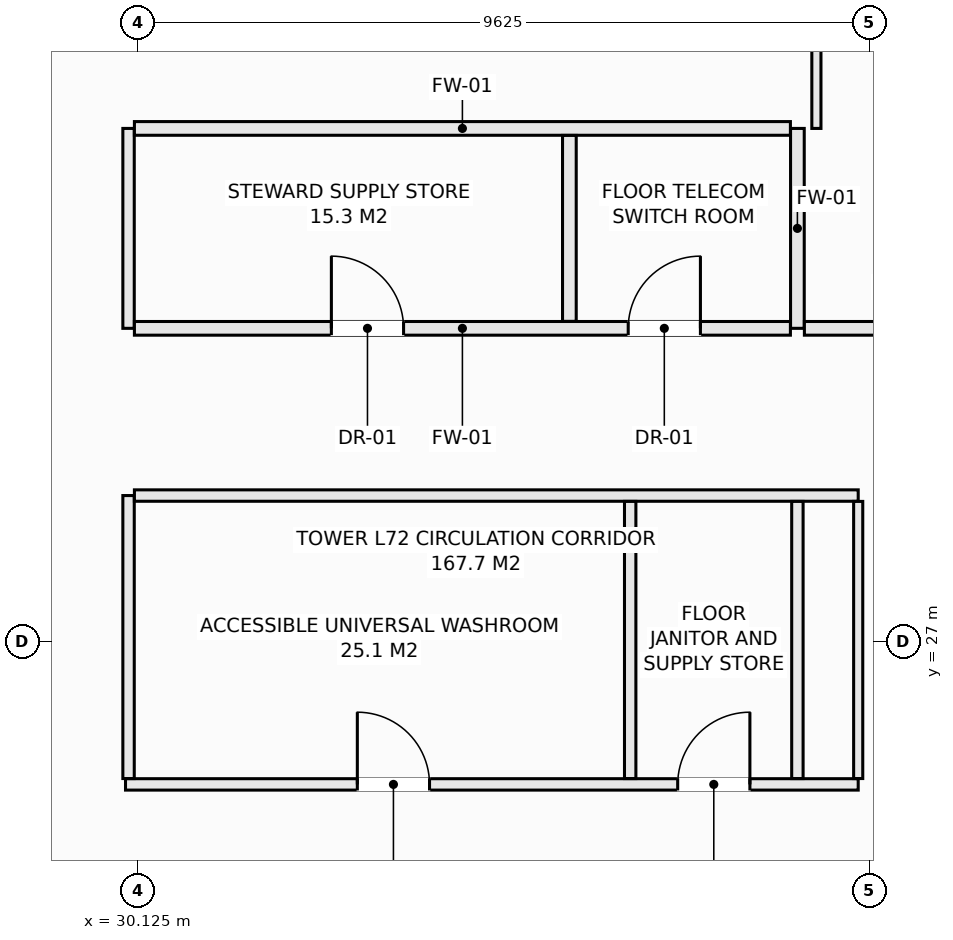
"""IFC4 building model, lengths in metres.
Left out: names, types, materials, properties, quantities, classifications, styles, units other than length and angle.
Written with IfcOpenShell. Run it as: python <this file> out.ifc"""

import sys

from ifc_helpers import new_model, si_unit, direction, frame, frame_2d, origin, place, context, subcontext, project, spatial, rectangle, extrude, element, fill, save


model = new_model("IFC4")
c1 = context("Model", 3, precision=1e-05, world=origin(), true_north=direction((0.0, 1.0)))
c2 = subcontext(c1, "Body", "Model", "MODEL_VIEW")
j1 = project(units=[si_unit("LENGTHUNIT", "METRE"), si_unit("PLANEANGLEUNIT", "RADIAN")], contexts=[c1])
p1 = place(None, origin())
s1 = spatial("IfcSite", under=j1, at=p1, CompositionType="ELEMENT")
p2 = place(p1, origin())
s2 = spatial("IfcBuilding", under=s1, at=p2, CompositionType="ELEMENT")
p3 = place(p2, frame((0.0, 0.0, 265.7)))
s3 = spatial("IfcBuildingStorey", under=s2, at=p3, CompositionType="ELEMENT", Elevation=265.7)
p4 = place(p3, frame((29.96, 25.12, 0.0), z_axis=(0.0, 0.0, 1.0), x_axis=(1.0, 0.0, 0.0)))
e1 = element("IfcWall", 1, at=p4, inside=s3, PredefinedType="PARTITIONING", context=c2, shape_type="SweptSolid", body=[
    extrude(rectangle(XDim=9.64, YDim=0.15, at=frame_2d((4.82, 0.0))), origin(), (0.0, 0.0, 1.0), 3.03),
])
p5 = place(p4, frame((3.05, 0.0, 0.0)))
e2 = element("IfcOpeningElement", 2, at=p5, cuts=e1, PredefinedType="OPENING", context=c2, shape_type="SweptSolid", body=[
    extrude(rectangle(XDim=0.95, YDim=2.1, at=frame_2d((0.475, 1.05))), frame((0.0, 0.085, 0.0), z_axis=(0.0, -1.0, 0.0), x_axis=(1.0, 0.0, 0.0)), (0.0, 0.0, 1.0), 0.17),
])
p6 = place(p4, frame((7.265, 0.0, 0.0)))
e3 = element("IfcOpeningElement", 3, at=p6, cuts=e1, PredefinedType="OPENING", context=c2, shape_type="SweptSolid", body=[
    extrude(rectangle(XDim=0.95, YDim=2.1, at=frame_2d((0.475, 1.05))), frame((0.0, 0.085, 0.0), z_axis=(0.0, -1.0, 0.0), x_axis=(1.0, 0.0, 0.0)), (0.0, 0.0, 1.0), 0.17),
])
p7 = place(p3, frame((30.0, 25.197, 0.0), z_axis=(0.0, 0.0, 1.0), x_axis=(0.0, 1.0, 0.0)))
e4 = element("IfcWall", 4, at=p7, inside=s3, PredefinedType="PARTITIONING", context=c2, shape_type="SweptSolid", body=[
    extrude(rectangle(XDim=3.723, YDim=0.15, at=frame_2d((1.861, 0.0))), origin(), (0.0, 0.0, 1.0), 3.03),
])
p8 = place(p3, frame((30.0, 31.12, 0.0), z_axis=(0.0, 0.0, 1.0), x_axis=(0.0, 1.0, 0.0)))
e5 = element("IfcWall", 5, at=p8, inside=s3, PredefinedType="PARTITIONING", context=c2, shape_type="SweptSolid", body=[
    extrude(rectangle(XDim=2.63, YDim=0.15, at=frame_2d((1.315, 0.0))), origin(), (0.0, 0.0, 1.0), 3.03),
])
p9 = place(p3, frame((30.077, 28.92, 0.0), z_axis=(0.0, 0.0, 1.0), x_axis=(1.0, 0.0, 0.0)))
e6 = element("IfcWall", 6, at=p9, inside=s3, PredefinedType="PARTITIONING", context=c2, shape_type="SweptSolid", body=[
    extrude(rectangle(XDim=9.523, YDim=0.15, at=frame_2d((4.762, 0.0))), origin(), (0.0, 0.0, 1.0), 3.03),
])
for number, where, z_axis, x_axis in (
    (7, (36.6, 25.197, 0.0), (0.0, 0.0, 1.0), (0.0, 1.0, 0.0)),
    (8, (38.8, 25.197, 0.0), (0.0, 0.0, 1.0), (0.0, 1.0, 0.0)),
):
    element("IfcWall", number, at=place(p3, frame(where, z_axis=z_axis, x_axis=x_axis)), inside=s3, PredefinedType="PARTITIONING", context=c2, shape_type="SweptSolid", body=[
        extrude(rectangle(XDim=3.646, YDim=0.15, at=frame_2d((1.823, 0.0))), origin(), (0.0, 0.0, 1.0), 3.03),
    ])
p10 = place(p3, frame((38.8, 31.12, 0.0), z_axis=(0.0, 0.0, 1.0), x_axis=(0.0, 1.0, 0.0)))
e9 = element("IfcWall", 9, at=p10, inside=s3, PredefinedType="SOLIDWALL", context=c2, shape_type="SweptSolid", body=[
    extrude(rectangle(XDim=2.63, YDim=0.18, at=frame_2d((1.315, 0.0))), origin(), (0.0, 0.0, 1.0), 3.03),
])
p11 = place(p3, frame((30.077, 31.12, 0.0), z_axis=(0.0, 0.0, 1.0), x_axis=(1.0, 0.0, 0.0)))
e10 = element("IfcWall", 10, at=p11, inside=s3, PredefinedType="SOLIDWALL", context=c2, shape_type="SweptSolid", body=[
    extrude(rectangle(XDim=8.631, YDim=0.18, at=frame_2d((4.315, 0.0))), origin(), (0.0, 0.0, 1.0), 3.03),
])
p12 = place(p11, frame((2.592, 0.0, 0.0)))
e11 = element("IfcOpeningElement", 11, at=p12, cuts=e10, PredefinedType="OPENING", context=c2, shape_type="SweptSolid", body=[
    extrude(rectangle(XDim=0.95, YDim=2.1, at=frame_2d((0.475, 1.05))), frame((0.0, 0.1, 0.0), z_axis=(0.0, -1.0, 0.0), x_axis=(1.0, 0.0, 0.0)), (0.0, 0.0, 1.0), 0.2),
])
p13 = place(p11, frame((6.497, 0.0, 0.0)))
e12 = element("IfcOpeningElement", 12, at=p13, cuts=e10, PredefinedType="OPENING", context=c2, shape_type="SweptSolid", body=[
    extrude(rectangle(XDim=0.95, YDim=2.1, at=frame_2d((0.475, 1.05))), frame((0.0, 0.1, 0.0), z_axis=(0.0, -1.0, 0.0), x_axis=(1.0, 0.0, 0.0)), (0.0, 0.0, 1.0), 0.2),
])
p14 = place(p3, frame((38.892, 31.12, 0.0), z_axis=(0.0, 0.0, 1.0), x_axis=(1.0, 0.0, 0.0)))
e13 = element("IfcWall", 13, at=p14, inside=s3, PredefinedType="SOLIDWALL", context=c2, shape_type="SweptSolid", body=[
    extrude(rectangle(XDim=2.628, YDim=0.18, at=frame_2d((1.314, 0.0))), origin(), (0.0, 0.0, 1.0), 3.03),
])
p15 = place(p3, frame((30.077, 33.75, 0.0), z_axis=(0.0, 0.0, 1.0), x_axis=(1.0, 0.0, 0.0)))
e14 = element("IfcWall", 14, at=p15, inside=s3, PredefinedType="SOLIDWALL", context=c2, shape_type="SweptSolid", body=[
    extrude(rectangle(XDim=8.631, YDim=0.18, at=frame_2d((4.315, 0.0))), origin(), (0.0, 0.0, 1.0), 3.03),
])
p16 = place(p3, frame((35.8, 31.212, 0.0), z_axis=(0.0, 0.0, 1.0), x_axis=(0.0, 1.0, 0.0)))
e15 = element("IfcWall", 15, at=p16, inside=s3, PredefinedType="SOLIDWALL", context=c2, shape_type="SweptSolid", body=[
    extrude(rectangle(XDim=2.446, YDim=0.18, at=frame_2d((1.223, 0.0))), origin(), (0.0, 0.0, 1.0), 3.03),
])
p17 = place(p3, frame((39.05, 33.75, 0.0), z_axis=(0.0, 0.0, 1.0), x_axis=(0.0, 1.0, 0.0)))
e16 = element("IfcWall", 16, at=p17, inside=s3, PredefinedType="PARTITIONING", context=c2, shape_type="SweptSolid", body=[
    extrude(rectangle(XDim=1.938, YDim=0.12, at=frame_2d((0.969, 0.0))), origin(), (0.0, 0.0, 1.0), 3.03),
])
p18 = place(p3, frame((39.6, 25.197, 0.0), z_axis=(0.0, 0.0, 1.0), x_axis=(0.0, 1.0, 0.0)))
e17 = element("IfcWall", 17, at=p18, inside=s3, PredefinedType="PARTITIONING", context=c2, shape_type="SweptSolid", body=[
    extrude(rectangle(XDim=3.646, YDim=0.12, at=frame_2d((1.823, 0.0))), origin(), (0.0, 0.0, 1.0), 3.03),
])
p19 = place(p5, origin())
e18 = element("IfcDoor", 18, at=p19, inside=s3, OperationType="SINGLE_SWING_LEFT", PredefinedType="DOOR", context=c2, shape_type="SweptSolid", body=[
    extrude(rectangle(XDim=0.95, YDim=2.1, at=frame_2d((0.475, 1.05))), frame((0.0, 0.025, 0.0), z_axis=(0.0, -1.0, 0.0), x_axis=(1.0, 0.0, 0.0)), (0.0, 0.0, 1.0), 0.05),
])
fill(e2, e18)
p20 = place(p6, origin())
e19 = element("IfcDoor", 19, at=p20, inside=s3, OperationType="SINGLE_SWING_RIGHT", PredefinedType="DOOR", context=c2, shape_type="SweptSolid", body=[
    extrude(rectangle(XDim=0.95, YDim=2.1, at=frame_2d((0.475, 1.05))), frame((0.0, 0.025, 0.0), z_axis=(0.0, -1.0, 0.0), x_axis=(1.0, 0.0, 0.0)), (0.0, 0.0, 1.0), 0.05),
])
fill(e3, e19)
p21 = place(p12, origin())
e20 = element("IfcDoor", 20, at=p21, inside=s3, OperationType="SINGLE_SWING_LEFT", PredefinedType="DOOR", context=c2, shape_type="SweptSolid", body=[
    extrude(rectangle(XDim=0.95, YDim=2.1, at=frame_2d((0.475, 1.05))), frame((0.0, 0.025, 0.0), z_axis=(0.0, -1.0, 0.0), x_axis=(1.0, 0.0, 0.0)), (0.0, 0.0, 1.0), 0.05),
])
fill(e11, e20)
p22 = place(p13, origin())
e21 = element("IfcDoor", 21, at=p22, inside=s3, OperationType="SINGLE_SWING_RIGHT", PredefinedType="DOOR", context=c2, shape_type="SweptSolid", body=[
    extrude(rectangle(XDim=0.95, YDim=2.1, at=frame_2d((0.475, 1.05))), frame((0.0, 0.025, 0.0), z_axis=(0.0, -1.0, 0.0), x_axis=(1.0, 0.0, 0.0)), (0.0, 0.0, 1.0), 0.05),
])
fill(e12, e21)
save(model, sys.argv[1])
